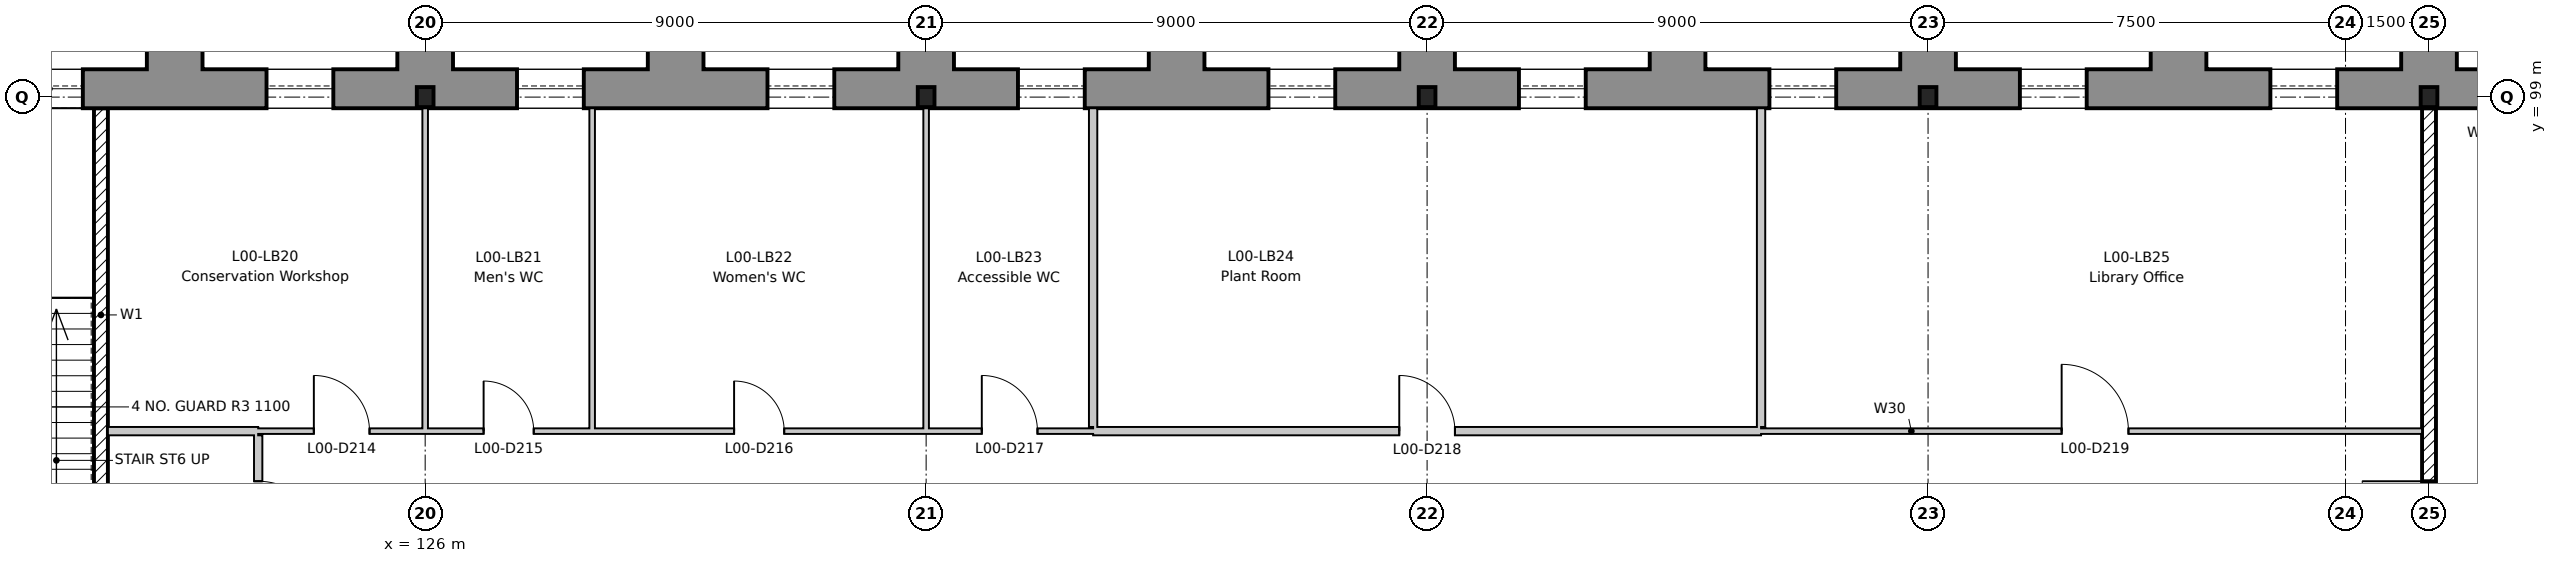
"""IFC4 building model, lengths in metres.
Left out: names, types, materials, properties, quantities, classifications, styles, units other than length and angle.
Written with IfcOpenShell. Run it as: python <this file> out.ifc"""

import sys

from ifc_helpers import new_model, si_unit, direction, frame, frame_2d, origin, origin_2d, place, context, subcontext, project, spatial, rectangle, i_section, extrude, element, fill, save


model = new_model("IFC4")
c1 = context("Model", 3, precision=1e-05, world=origin(), true_north=direction((0.0, 1.0)))
c2 = subcontext(c1, "Body", "Model", "MODEL_VIEW")
j1 = project(units=[si_unit("LENGTHUNIT", "METRE"), si_unit("PLANEANGLEUNIT", "RADIAN")], contexts=[c1])
p1 = place(None, origin())
s1 = spatial("IfcSite", under=j1, at=p1, CompositionType="ELEMENT")
p2 = place(p1, origin())
s2 = spatial("IfcBuilding", under=s1, at=p2, CompositionType="ELEMENT")
p3 = place(p2, origin())
s3 = spatial("IfcBuildingStorey", under=s2, at=p3, CompositionType="ELEMENT", Elevation=0.0)
for number, where, z_axis, x_axis in (
    (1, (126.0, 99.0, -0.6), (0.0, 0.0, 1.0), (1.0, 0.0, 0.0)),
    (2, (135.0, 99.0, -0.6), (0.0, 0.0, 1.0), (1.0, 0.0, 0.0)),
    (3, (144.0, 99.0, -0.6), (0.0, 0.0, 1.0), (1.0, 0.0, 0.0)),
    (4, (153.0, 99.0, -0.6), (0.0, 0.0, 1.0), (1.0, 0.0, 0.0)),
    (5, (162.0, 99.0, -0.6), (0.0, 0.0, 1.0), (1.0, 0.0, 0.0)),
):
    element("IfcColumn", number, at=place(p3, frame(where, z_axis=z_axis, x_axis=x_axis)), inside=s3, PredefinedType="COLUMN", context=c2, shape_type="SweptSolid", body=[
        extrude(i_section(OverallWidth=0.3, OverallDepth=0.36, WebThickness=0.012, FlangeThickness=0.022, FilletRadius=0.027, at=origin_2d()), origin(), (0.0, 0.0, 1.0), 5.8),
    ])
p4 = place(p3, frame((162.0, 98.8, 0.0), z_axis=(0.0, 0.0, 1.0), x_axis=(0.0, -1.0, 0.0)))
e6 = element("IfcWall", 6, at=p4, inside=s3, PredefinedType="SHEAR", context=c2, shape_type="SweptSolid", body=[
    extrude(rectangle(XDim=8.65, YDim=0.25, at=frame_2d((4.325, 0.0))), origin(), (0.0, 0.0, 1.0), 5.2),
])
p5 = place(p4, frame((6.7, 0.0, 0.0)))
e7 = element("IfcOpeningElement", 7, at=p5, cuts=e6, PredefinedType="OPENING", context=c2, shape_type="SweptSolid", body=[
    extrude(rectangle(XDim=1.2, YDim=2.1, at=frame_2d((0.6, 1.05))), frame((0.0, 0.135, 0.0), z_axis=(0.0, -1.0, 0.0), x_axis=(1.0, 0.0, 0.0)), (0.0, 0.0, 1.0), 0.27),
])
p6 = place(p3, frame((120.175, 90.125, 0.0), z_axis=(0.0, 0.0, 1.0), x_axis=(0.0, 1.0, 0.0)))
e8 = element("IfcWall", 8, at=p6, inside=s3, PredefinedType="SHEAR", context=c2, shape_type="SweptSolid", body=[
    extrude(rectangle(XDim=8.675, YDim=0.25, at=frame_2d((4.337, 0.0))), origin(), (0.0, 0.0, 1.0), 5.2),
])
p7 = place(p6, frame((0.25, 0.0, 0.0)))
e9 = element("IfcOpeningElement", 9, at=p7, cuts=e8, PredefinedType="OPENING", context=c2, shape_type="SweptSolid", body=[
    extrude(rectangle(XDim=1.0, YDim=2.1, at=frame_2d((0.5, 1.05))), frame((0.0, 0.135, 0.0), z_axis=(0.0, -1.0, 0.0), x_axis=(1.0, 0.0, 0.0)), (0.0, 0.0, 1.0), 0.27),
])
p8 = place(p3, frame((116.5, 99.15, 0.0), z_axis=(0.0, 0.0, 1.0), x_axis=(1.0, 0.0, 0.0)))
e10 = element("IfcWall", 10, at=p8, inside=s3, PredefinedType="STANDARD", context=c2, shape_type="SweptSolid", body=[
    extrude(rectangle(XDim=55.0, YDim=0.7, at=frame_2d((27.5, 0.0))), origin(), (0.0, 0.0, 1.0), 5.2),
])
p9 = place(p8, frame((2.15, 0.0, 1.2)))
e11 = element("IfcOpeningElement", 11, at=p9, cuts=e10, PredefinedType="OPENING", context=c2, shape_type="SweptSolid", body=[
    extrude(rectangle(XDim=1.2, YDim=1.8, at=frame_2d((0.6, 0.9))), frame((0.0, 0.36, 0.0), z_axis=(0.0, -1.0, 0.0), x_axis=(1.0, 0.0, 0.0)), (0.0, 0.0, 1.0), 0.72),
])
p10 = place(p8, frame((6.65, 0.0, 1.2)))
e12 = element("IfcOpeningElement", 12, at=p10, cuts=e10, PredefinedType="OPENING", context=c2, shape_type="SweptSolid", body=[
    extrude(rectangle(XDim=1.2, YDim=1.8, at=frame_2d((0.6, 0.9))), frame((0.0, 0.36, 0.0), z_axis=(0.0, -1.0, 0.0), x_axis=(1.0, 0.0, 0.0)), (0.0, 0.0, 1.0), 0.72),
])
p11 = place(p8, frame((11.15, 0.0, 1.2)))
e13 = element("IfcOpeningElement", 13, at=p11, cuts=e10, PredefinedType="OPENING", context=c2, shape_type="SweptSolid", body=[
    extrude(rectangle(XDim=1.2, YDim=1.8, at=frame_2d((0.6, 0.9))), frame((0.0, 0.36, 0.0), z_axis=(0.0, -1.0, 0.0), x_axis=(1.0, 0.0, 0.0)), (0.0, 0.0, 1.0), 0.72),
])
p12 = place(p8, frame((15.65, 0.0, 1.2)))
e14 = element("IfcOpeningElement", 14, at=p12, cuts=e10, PredefinedType="OPENING", context=c2, shape_type="SweptSolid", body=[
    extrude(rectangle(XDim=1.2, YDim=1.8, at=frame_2d((0.6, 0.9))), frame((0.0, 0.36, 0.0), z_axis=(0.0, -1.0, 0.0), x_axis=(1.0, 0.0, 0.0)), (0.0, 0.0, 1.0), 0.72),
])
p13 = place(p8, frame((20.15, 0.0, 1.2)))
e15 = element("IfcOpeningElement", 15, at=p13, cuts=e10, PredefinedType="OPENING", context=c2, shape_type="SweptSolid", body=[
    extrude(rectangle(XDim=1.2, YDim=1.8, at=frame_2d((0.6, 0.9))), frame((0.0, 0.36, 0.0), z_axis=(0.0, -1.0, 0.0), x_axis=(1.0, 0.0, 0.0)), (0.0, 0.0, 1.0), 0.72),
])
p14 = place(p8, frame((24.65, 0.0, 1.2)))
e16 = element("IfcOpeningElement", 16, at=p14, cuts=e10, PredefinedType="OPENING", context=c2, shape_type="SweptSolid", body=[
    extrude(rectangle(XDim=1.2, YDim=1.8, at=frame_2d((0.6, 0.9))), frame((0.0, 0.36, 0.0), z_axis=(0.0, -1.0, 0.0), x_axis=(1.0, 0.0, 0.0)), (0.0, 0.0, 1.0), 0.72),
])
p15 = place(p8, frame((29.15, 0.0, 1.2)))
e17 = element("IfcOpeningElement", 17, at=p15, cuts=e10, PredefinedType="OPENING", context=c2, shape_type="SweptSolid", body=[
    extrude(rectangle(XDim=1.2, YDim=1.8, at=frame_2d((0.6, 0.9))), frame((0.0, 0.36, 0.0), z_axis=(0.0, -1.0, 0.0), x_axis=(1.0, 0.0, 0.0)), (0.0, 0.0, 1.0), 0.72),
])
p16 = place(p8, frame((33.65, 0.0, 1.2)))
e18 = element("IfcOpeningElement", 18, at=p16, cuts=e10, PredefinedType="OPENING", context=c2, shape_type="SweptSolid", body=[
    extrude(rectangle(XDim=1.2, YDim=1.8, at=frame_2d((0.6, 0.9))), frame((0.0, 0.36, 0.0), z_axis=(0.0, -1.0, 0.0), x_axis=(1.0, 0.0, 0.0)), (0.0, 0.0, 1.0), 0.72),
])
p17 = place(p8, frame((38.15, 0.0, 1.2)))
e19 = element("IfcOpeningElement", 19, at=p17, cuts=e10, PredefinedType="OPENING", context=c2, shape_type="SweptSolid", body=[
    extrude(rectangle(XDim=1.2, YDim=1.8, at=frame_2d((0.6, 0.9))), frame((0.0, 0.36, 0.0), z_axis=(0.0, -1.0, 0.0), x_axis=(1.0, 0.0, 0.0)), (0.0, 0.0, 1.0), 0.72),
])
p18 = place(p8, frame((42.65, 0.0, 1.2)))
e20 = element("IfcOpeningElement", 20, at=p18, cuts=e10, PredefinedType="OPENING", context=c2, shape_type="SweptSolid", body=[
    extrude(rectangle(XDim=1.2, YDim=1.8, at=frame_2d((0.6, 0.9))), frame((0.0, 0.36, 0.0), z_axis=(0.0, -1.0, 0.0), x_axis=(1.0, 0.0, 0.0)), (0.0, 0.0, 1.0), 0.72),
])
p19 = place(p8, frame((49.1, 0.0, 0.0)))
e21 = element("IfcOpeningElement", 21, at=p19, cuts=e10, PredefinedType="OPENING", context=c2, shape_type="SweptSolid", body=[
    extrude(rectangle(XDim=1.8, YDim=2.1, at=frame_2d((0.9, 1.05))), frame((0.0, 0.36, 0.0), z_axis=(0.0, -1.0, 0.0), x_axis=(1.0, 0.0, 0.0)), (0.0, 0.0, 1.0), 0.72),
])
for number, where, z_axis, x_axis in (
    (22, (121.0, 100.1, 0.0), (0.0, 0.0, 1.0), (1.0, 0.0, 0.0)),
    (23, (125.5, 100.1, 0.0), (0.0, 0.0, 1.0), (1.0, 0.0, 0.0)),
    (24, (130.0, 100.1, 0.0), (0.0, 0.0, 1.0), (1.0, 0.0, 0.0)),
    (25, (134.5, 100.1, 0.0), (0.0, 0.0, 1.0), (1.0, 0.0, 0.0)),
    (26, (139.0, 100.1, 0.0), (0.0, 0.0, 1.0), (1.0, 0.0, 0.0)),
    (27, (143.5, 100.1, 0.0), (0.0, 0.0, 1.0), (1.0, 0.0, 0.0)),
    (28, (148.0, 100.1, 0.0), (0.0, 0.0, 1.0), (1.0, 0.0, 0.0)),
    (29, (152.5, 100.1, 0.0), (0.0, 0.0, 1.0), (1.0, 0.0, 0.0)),
    (30, (157.0, 100.1, 0.0), (0.0, 0.0, 1.0), (1.0, 0.0, 0.0)),
    (31, (161.5, 100.1, 0.0), (0.0, 0.0, 1.0), (1.0, 0.0, 0.0)),
):
    element("IfcWall", number, at=place(p3, frame(where, z_axis=z_axis, x_axis=x_axis)), inside=s3, PredefinedType="STANDARD", context=c2, shape_type="SweptSolid", body=[
        extrude(rectangle(XDim=1.0, YDim=1.2, at=frame_2d((0.5, 0.0))), origin(), (0.0, 0.0, 1.0), 5.4),
    ])
p20 = place(p3, frame((120.3, 93.0, 0.0), z_axis=(0.0, 0.0, 1.0), x_axis=(1.0, 0.0, 0.0)))
e32 = element("IfcWall", 32, at=p20, inside=s3, PredefinedType="PARTITIONING", context=c2, shape_type="SweptSolid", body=[
    extrude(rectangle(XDim=2.7, YDim=0.15, at=frame_2d((1.35, 0.0))), origin(), (0.0, 0.0, 1.0), 4.68),
])
p21 = place(p3, frame((138.0, 93.0, 0.0), z_axis=(0.0, 0.0, 1.0), x_axis=(1.0, 0.0, 0.0)))
e33 = element("IfcWall", 33, at=p21, inside=s3, PredefinedType="PARTITIONING", context=c2, shape_type="SweptSolid", body=[
    extrude(rectangle(XDim=12.0, YDim=0.15, at=frame_2d((6.0, 0.0))), origin(), (0.0, 0.0, 1.0), 4.68),
])
p22 = place(p21, frame((5.5, 0.0, 0.0)))
e34 = element("IfcOpeningElement", 34, at=p22, cuts=e33, PredefinedType="OPENING", context=c2, shape_type="SweptSolid", body=[
    extrude(rectangle(XDim=1.0, YDim=2.1, at=frame_2d((0.5, 1.05))), frame((0.0, 0.085, 0.0), z_axis=(0.0, -1.0, 0.0), x_axis=(1.0, 0.0, 0.0)), (0.0, 0.0, 1.0), 0.17),
])
p23 = place(p3, frame((123.0, 93.0, 0.0), z_axis=(0.0, 0.0, 1.0), x_axis=(1.0, 0.0, 0.0)))
e35 = element("IfcWall", 35, at=p23, inside=s3, PredefinedType="PARTITIONING", context=c2, shape_type="SweptSolid", body=[
    extrude(rectangle(XDim=15.0, YDim=0.1, at=frame_2d((7.5, 0.0))), origin(), (0.0, 0.0, 1.0), 4.68),
])
p24 = place(p23, frame((1.0, 0.0, 0.0)))
e36 = element("IfcOpeningElement", 36, at=p24, cuts=e35, PredefinedType="OPENING", context=c2, shape_type="SweptSolid", body=[
    extrude(rectangle(XDim=1.0, YDim=2.1, at=frame_2d((0.5, 1.05))), frame((0.0, 0.06, 0.0), z_axis=(0.0, -1.0, 0.0), x_axis=(1.0, 0.0, 0.0)), (0.0, 0.0, 1.0), 0.12),
])
p25 = place(p23, frame((4.05, 0.0, 0.0)))
e37 = element("IfcOpeningElement", 37, at=p25, cuts=e35, PredefinedType="OPENING", context=c2, shape_type="SweptSolid", body=[
    extrude(rectangle(XDim=0.9, YDim=2.1, at=frame_2d((0.45, 1.05))), frame((0.0, 0.06, 0.0), z_axis=(0.0, -1.0, 0.0), x_axis=(1.0, 0.0, 0.0)), (0.0, 0.0, 1.0), 0.12),
])
p26 = place(p23, frame((8.55, 0.0, 0.0)))
e38 = element("IfcOpeningElement", 38, at=p26, cuts=e35, PredefinedType="OPENING", context=c2, shape_type="SweptSolid", body=[
    extrude(rectangle(XDim=0.9, YDim=2.1, at=frame_2d((0.45, 1.05))), frame((0.0, 0.06, 0.0), z_axis=(0.0, -1.0, 0.0), x_axis=(1.0, 0.0, 0.0)), (0.0, 0.0, 1.0), 0.12),
])
p27 = place(p23, frame((13.0, 0.0, 0.0)))
e39 = element("IfcOpeningElement", 39, at=p27, cuts=e35, PredefinedType="OPENING", context=c2, shape_type="SweptSolid", body=[
    extrude(rectangle(XDim=1.0, YDim=2.1, at=frame_2d((0.5, 1.05))), frame((0.0, 0.06, 0.0), z_axis=(0.0, -1.0, 0.0), x_axis=(1.0, 0.0, 0.0)), (0.0, 0.0, 1.0), 0.12),
])
p28 = place(p3, frame((150.0, 93.0, 0.0), z_axis=(0.0, 0.0, 1.0), x_axis=(1.0, 0.0, 0.0)))
e40 = element("IfcWall", 40, at=p28, inside=s3, PredefinedType="PARTITIONING", context=c2, shape_type="SweptSolid", body=[
    extrude(rectangle(XDim=11.875, YDim=0.1, at=frame_2d((5.938, 0.0))), origin(), (0.0, 0.0, 1.0), 4.68),
])
p29 = place(p28, frame((5.4, 0.0, 0.0)))
e41 = element("IfcOpeningElement", 41, at=p29, cuts=e40, PredefinedType="OPENING", context=c2, shape_type="SweptSolid", body=[
    extrude(rectangle(XDim=1.2, YDim=2.1, at=frame_2d((0.6, 1.05))), frame((0.0, 0.06, 0.0), z_axis=(0.0, -1.0, 0.0), x_axis=(1.0, 0.0, 0.0)), (0.0, 0.0, 1.0), 0.12),
])
p30 = place(p3, frame((123.0, 90.075, 0.0), z_axis=(0.0, 0.0, 1.0), x_axis=(0.0, 1.0, 0.0)))
e42 = element("IfcWall", 42, at=p30, inside=s3, PredefinedType="PARTITIONING", context=c2, shape_type="SweptSolid", body=[
    extrude(rectangle(XDim=2.85, YDim=0.15, at=frame_2d((1.425, 0.0))), origin(), (0.0, 0.0, 1.0), 4.68),
])
p31 = place(p30, frame((0.825, 0.0, 0.0)))
e43 = element("IfcOpeningElement", 43, at=p31, cuts=e42, PredefinedType="OPENING", context=c2, shape_type="SweptSolid", body=[
    extrude(rectangle(XDim=1.2, YDim=2.1, at=frame_2d((0.6, 1.05))), frame((0.0, 0.085, 0.0), z_axis=(0.0, -1.0, 0.0), x_axis=(1.0, 0.0, 0.0)), (0.0, 0.0, 1.0), 0.17),
])
for number, where, z_axis, x_axis in (
    (44, (126.0, 93.05, 0.0), (0.0, 0.0, 1.0), (0.0, 1.0, 0.0)),
    (45, (129.0, 93.05, 0.0), (0.0, 0.0, 1.0), (0.0, 1.0, 0.0)),
    (46, (135.0, 93.05, 0.0), (0.0, 0.0, 1.0), (0.0, 1.0, 0.0)),
):
    element("IfcWall", number, at=place(p3, frame(where, z_axis=z_axis, x_axis=x_axis)), inside=s3, PredefinedType="PARTITIONING", context=c2, shape_type="SweptSolid", body=[
        extrude(rectangle(XDim=5.75, YDim=0.1, at=frame_2d((2.875, 0.0))), origin(), (0.0, 0.0, 1.0), 4.68),
    ])
for number, where, z_axis, x_axis in (
    (47, (138.0, 93.075, 0.0), (0.0, 0.0, 1.0), (0.0, 1.0, 0.0)),
    (48, (150.0, 93.075, 0.0), (0.0, 0.0, 1.0), (0.0, 1.0, 0.0)),
):
    element("IfcWall", number, at=place(p3, frame(where, z_axis=z_axis, x_axis=x_axis)), inside=s3, PredefinedType="PARTITIONING", context=c2, shape_type="SweptSolid", body=[
        extrude(rectangle(XDim=5.725, YDim=0.15, at=frame_2d((2.863, 0.0))), origin(), (0.0, 0.0, 1.0), 4.68),
    ])
p32 = place(p9, origin())
e49 = element("IfcWindow", 49, at=p32, inside=s3, PartitioningType="SINGLE_PANEL", PredefinedType="WINDOW", context=c2, shape_type="SweptSolid", body=[
    extrude(rectangle(XDim=1.2, YDim=1.8, at=frame_2d((0.6, 0.9))), frame((0.0, 0.03, 0.0), z_axis=(0.0, -1.0, 0.0), x_axis=(1.0, 0.0, 0.0)), (0.0, 0.0, 1.0), 0.06),
])
fill(e11, e49)
p33 = place(p10, origin())
e50 = element("IfcWindow", 50, at=p33, inside=s3, PartitioningType="SINGLE_PANEL", PredefinedType="WINDOW", context=c2, shape_type="SweptSolid", body=[
    extrude(rectangle(XDim=1.2, YDim=1.8, at=frame_2d((0.6, 0.9))), frame((0.0, 0.03, 0.0), z_axis=(0.0, -1.0, 0.0), x_axis=(1.0, 0.0, 0.0)), (0.0, 0.0, 1.0), 0.06),
])
fill(e12, e50)
p34 = place(p11, origin())
e51 = element("IfcWindow", 51, at=p34, inside=s3, PartitioningType="SINGLE_PANEL", PredefinedType="WINDOW", context=c2, shape_type="SweptSolid", body=[
    extrude(rectangle(XDim=1.2, YDim=1.8, at=frame_2d((0.6, 0.9))), frame((0.0, 0.03, 0.0), z_axis=(0.0, -1.0, 0.0), x_axis=(1.0, 0.0, 0.0)), (0.0, 0.0, 1.0), 0.06),
])
fill(e13, e51)
p35 = place(p12, origin())
e52 = element("IfcWindow", 52, at=p35, inside=s3, PartitioningType="SINGLE_PANEL", PredefinedType="WINDOW", context=c2, shape_type="SweptSolid", body=[
    extrude(rectangle(XDim=1.2, YDim=1.8, at=frame_2d((0.6, 0.9))), frame((0.0, 0.03, 0.0), z_axis=(0.0, -1.0, 0.0), x_axis=(1.0, 0.0, 0.0)), (0.0, 0.0, 1.0), 0.06),
])
fill(e14, e52)
p36 = place(p13, origin())
e53 = element("IfcWindow", 53, at=p36, inside=s3, PartitioningType="SINGLE_PANEL", PredefinedType="WINDOW", context=c2, shape_type="SweptSolid", body=[
    extrude(rectangle(XDim=1.2, YDim=1.8, at=frame_2d((0.6, 0.9))), frame((0.0, 0.03, 0.0), z_axis=(0.0, -1.0, 0.0), x_axis=(1.0, 0.0, 0.0)), (0.0, 0.0, 1.0), 0.06),
])
fill(e15, e53)
p37 = place(p14, origin())
e54 = element("IfcWindow", 54, at=p37, inside=s3, PartitioningType="SINGLE_PANEL", PredefinedType="WINDOW", context=c2, shape_type="SweptSolid", body=[
    extrude(rectangle(XDim=1.2, YDim=1.8, at=frame_2d((0.6, 0.9))), frame((0.0, 0.03, 0.0), z_axis=(0.0, -1.0, 0.0), x_axis=(1.0, 0.0, 0.0)), (0.0, 0.0, 1.0), 0.06),
])
fill(e16, e54)
p38 = place(p15, origin())
e55 = element("IfcWindow", 55, at=p38, inside=s3, PartitioningType="SINGLE_PANEL", PredefinedType="WINDOW", context=c2, shape_type="SweptSolid", body=[
    extrude(rectangle(XDim=1.2, YDim=1.8, at=frame_2d((0.6, 0.9))), frame((0.0, 0.03, 0.0), z_axis=(0.0, -1.0, 0.0), x_axis=(1.0, 0.0, 0.0)), (0.0, 0.0, 1.0), 0.06),
])
fill(e17, e55)
p39 = place(p16, origin())
e56 = element("IfcWindow", 56, at=p39, inside=s3, PartitioningType="SINGLE_PANEL", PredefinedType="WINDOW", context=c2, shape_type="SweptSolid", body=[
    extrude(rectangle(XDim=1.2, YDim=1.8, at=frame_2d((0.6, 0.9))), frame((0.0, 0.03, 0.0), z_axis=(0.0, -1.0, 0.0), x_axis=(1.0, 0.0, 0.0)), (0.0, 0.0, 1.0), 0.06),
])
fill(e18, e56)
p40 = place(p17, origin())
e57 = element("IfcWindow", 57, at=p40, inside=s3, PartitioningType="SINGLE_PANEL", PredefinedType="WINDOW", context=c2, shape_type="SweptSolid", body=[
    extrude(rectangle(XDim=1.2, YDim=1.8, at=frame_2d((0.6, 0.9))), frame((0.0, 0.03, 0.0), z_axis=(0.0, -1.0, 0.0), x_axis=(1.0, 0.0, 0.0)), (0.0, 0.0, 1.0), 0.06),
])
fill(e19, e57)
p41 = place(p18, origin())
e58 = element("IfcWindow", 58, at=p41, inside=s3, PartitioningType="SINGLE_PANEL", PredefinedType="WINDOW", context=c2, shape_type="SweptSolid", body=[
    extrude(rectangle(XDim=1.2, YDim=1.8, at=frame_2d((0.6, 0.9))), frame((0.0, 0.03, 0.0), z_axis=(0.0, -1.0, 0.0), x_axis=(1.0, 0.0, 0.0)), (0.0, 0.0, 1.0), 0.06),
])
fill(e20, e58)
p42 = place(p31, frame((1.2, 0.0, 0.0), z_axis=(0.0, 0.0, 1.0), x_axis=(-1.0, 0.0, 0.0)))
e59 = element("IfcDoor", 59, at=p42, inside=s3, OperationType="SINGLE_SWING_RIGHT", PredefinedType="DOOR", context=c2, shape_type="SweptSolid", body=[
    extrude(rectangle(XDim=1.2, YDim=2.1, at=frame_2d((0.6, 1.05))), frame((0.0, 0.025, 0.0), z_axis=(0.0, -1.0, 0.0), x_axis=(1.0, 0.0, 0.0)), (0.0, 0.0, 1.0), 0.05),
])
fill(e43, e59)
p43 = place(p24, origin())
e60 = element("IfcDoor", 60, at=p43, inside=s3, OperationType="SINGLE_SWING_LEFT", PredefinedType="DOOR", context=c2, shape_type="SweptSolid", body=[
    extrude(rectangle(XDim=1.0, YDim=2.1, at=frame_2d((0.5, 1.05))), frame((0.0, 0.025, 0.0), z_axis=(0.0, -1.0, 0.0), x_axis=(1.0, 0.0, 0.0)), (0.0, 0.0, 1.0), 0.05),
])
fill(e36, e60)
p44 = place(p25, origin())
e61 = element("IfcDoor", 61, at=p44, inside=s3, OperationType="SINGLE_SWING_LEFT", PredefinedType="DOOR", context=c2, shape_type="SweptSolid", body=[
    extrude(rectangle(XDim=0.9, YDim=2.1, at=frame_2d((0.45, 1.05))), frame((0.0, 0.025, 0.0), z_axis=(0.0, -1.0, 0.0), x_axis=(1.0, 0.0, 0.0)), (0.0, 0.0, 1.0), 0.05),
])
fill(e37, e61)
p45 = place(p26, origin())
e62 = element("IfcDoor", 62, at=p45, inside=s3, OperationType="SINGLE_SWING_LEFT", PredefinedType="DOOR", context=c2, shape_type="SweptSolid", body=[
    extrude(rectangle(XDim=0.9, YDim=2.1, at=frame_2d((0.45, 1.05))), frame((0.0, 0.025, 0.0), z_axis=(0.0, -1.0, 0.0), x_axis=(1.0, 0.0, 0.0)), (0.0, 0.0, 1.0), 0.05),
])
fill(e38, e62)
p46 = place(p27, origin())
e63 = element("IfcDoor", 63, at=p46, inside=s3, OperationType="SINGLE_SWING_LEFT", PredefinedType="DOOR", context=c2, shape_type="SweptSolid", body=[
    extrude(rectangle(XDim=1.0, YDim=2.1, at=frame_2d((0.5, 1.05))), frame((0.0, 0.025, 0.0), z_axis=(0.0, -1.0, 0.0), x_axis=(1.0, 0.0, 0.0)), (0.0, 0.0, 1.0), 0.05),
])
fill(e39, e63)
p47 = place(p22, origin())
e64 = element("IfcDoor", 64, at=p47, inside=s3, OperationType="SINGLE_SWING_LEFT", PredefinedType="DOOR", context=c2, shape_type="SweptSolid", body=[
    extrude(rectangle(XDim=1.0, YDim=2.1, at=frame_2d((0.5, 1.05))), frame((0.0, 0.025, 0.0), z_axis=(0.0, -1.0, 0.0), x_axis=(1.0, 0.0, 0.0)), (0.0, 0.0, 1.0), 0.05),
])
fill(e34, e64)
p48 = place(p29, origin())
e65 = element("IfcDoor", 65, at=p48, inside=s3, OperationType="SINGLE_SWING_LEFT", PredefinedType="DOOR", context=c2, shape_type="SweptSolid", body=[
    extrude(rectangle(XDim=1.2, YDim=2.1, at=frame_2d((0.6, 1.05))), frame((0.0, 0.025, 0.0), z_axis=(0.0, -1.0, 0.0), x_axis=(1.0, 0.0, 0.0)), (0.0, 0.0, 1.0), 0.05),
])
fill(e41, e65)
p49 = place(p5, frame((1.2, 0.0, 0.0), z_axis=(0.0, 0.0, 1.0), x_axis=(-1.0, 0.0, 0.0)))
e66 = element("IfcDoor", 66, at=p49, inside=s3, OperationType="SINGLE_SWING_RIGHT", PredefinedType="DOOR", context=c2, shape_type="SweptSolid", body=[
    extrude(rectangle(XDim=1.2, YDim=2.1, at=frame_2d((0.6, 1.05))), frame((0.0, 0.025, 0.0), z_axis=(0.0, -1.0, 0.0), x_axis=(1.0, 0.0, 0.0)), (0.0, 0.0, 1.0), 0.05),
])
fill(e7, e66)
save(model, sys.argv[1])
